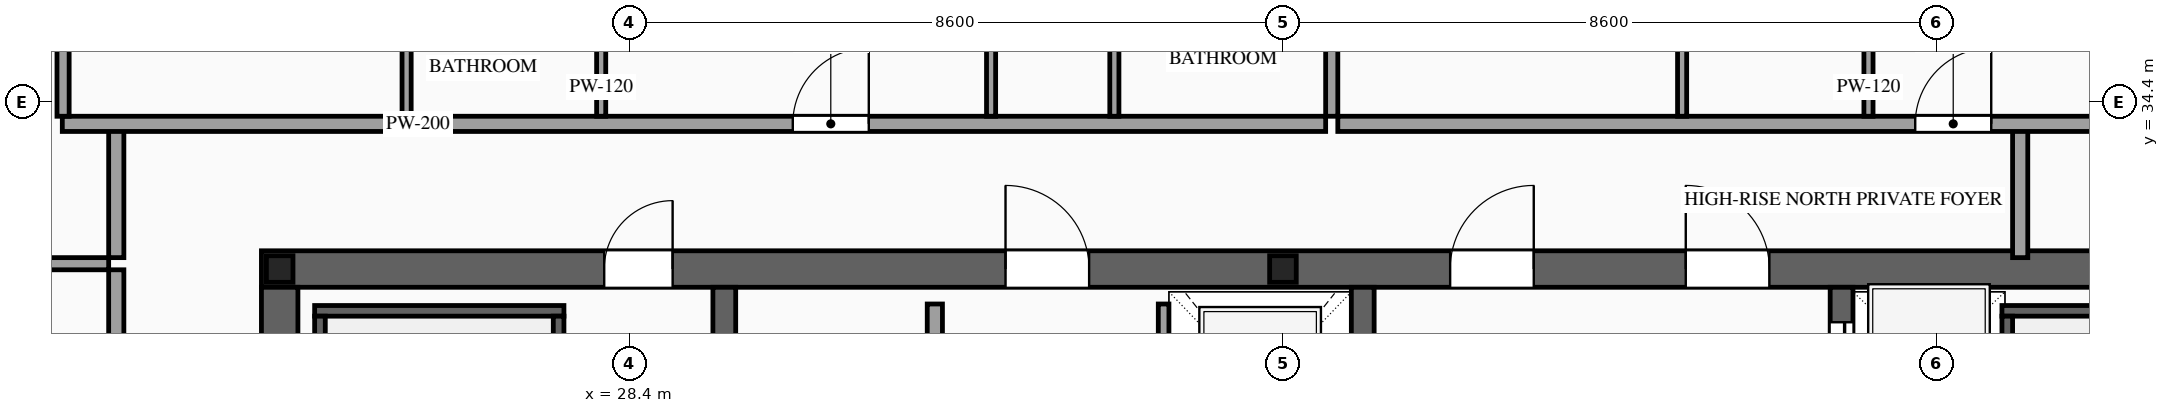
"""IFC4 building model, lengths in metres.
Left out: names, types, materials, properties, quantities, classifications, styles, units other than length and angle.
Written with IfcOpenShell. Run it as: python <this file> out.ifc"""

import sys

from ifc_helpers import new_model, si_unit, direction, frame, frame_2d, origin, origin_2d, place, context, subcontext, project, spatial, rectangle, i_section, extrude, source, transform, mapped, element, fill, save


model = new_model("IFC4")
c1 = context("Model", 3, precision=1e-05, world=origin(), true_north=direction((0.0, 1.0)))
c2 = subcontext(c1, "Body", "Model", "MODEL_VIEW")
j1 = project(units=[si_unit("LENGTHUNIT", "METRE"), si_unit("PLANEANGLEUNIT", "RADIAN")], contexts=[c1])
p1 = place(None, origin())
s1 = spatial("IfcSite", under=j1, at=p1, CompositionType="ELEMENT")
p2 = place(p1, origin())
s2 = spatial("IfcBuilding", under=s1, at=p2, CompositionType="ELEMENT")
p3 = place(p2, frame((0.0, 0.0, 289.1)))
s3 = spatial("IfcBuildingStorey", under=s2, at=p3, CompositionType="ELEMENT", Elevation=289.1)
p4 = place(p3, frame((23.56, 32.2, 0.0), z_axis=(0.0, 0.0, 1.0), x_axis=(1.0, 0.0, 0.0)))
e1 = element("IfcWall", 1, at=p4, inside=s3, PredefinedType="SHEAR", context=c2, shape_type="SweptSolid", body=[
    extrude(rectangle(XDim=26.88, YDim=0.48, at=frame_2d((13.44, 0.0))), origin(), (0.0, 0.0, 1.0), 3.5),
])
p5 = place(p4, frame((4.51, 0.0, 0.0)))
e2 = element("IfcOpeningElement", 2, at=p5, cuts=e1, PredefinedType="OPENING", context=c2, shape_type="SweptSolid", body=[
    extrude(rectangle(XDim=0.9, YDim=2.15, at=frame_2d((0.45, 1.075))), frame((0.0, 0.255, 0.0), z_axis=(0.0, -1.0, 0.0), x_axis=(1.0, 0.0, 0.0)), (0.0, 0.0, 1.0), 0.51),
])
p6 = place(p4, frame((9.79, 0.0, 0.0)))
e3 = element("IfcOpeningElement", 3, at=p6, cuts=e1, PredefinedType="OPENING", context=c2, shape_type="SweptSolid", body=[
    extrude(rectangle(XDim=1.1, YDim=2.2, at=frame_2d((0.55, 1.1))), frame((0.0, 0.255, 0.0), z_axis=(0.0, -1.0, 0.0), x_axis=(1.0, 0.0, 0.0)), (0.0, 0.0, 1.0), 0.51),
])
p7 = place(p4, frame((15.64, 0.0, 0.0)))
e4 = element("IfcOpeningElement", 4, at=p7, cuts=e1, PredefinedType="OPENING", context=c2, shape_type="SweptSolid", body=[
    extrude(rectangle(XDim=1.1, YDim=2.2, at=frame_2d((0.55, 1.1))), frame((0.0, 0.255, 0.0), z_axis=(0.0, -1.0, 0.0), x_axis=(1.0, 0.0, 0.0)), (0.0, 0.0, 1.0), 0.51),
])
p8 = place(p4, frame((18.74, 0.0, 0.0)))
e5 = element("IfcOpeningElement", 5, at=p8, cuts=e1, PredefinedType="OPENING", context=c2, shape_type="SweptSolid", body=[
    extrude(rectangle(XDim=1.1, YDim=2.2, at=frame_2d((0.55, 1.1))), frame((0.0, 0.255, 0.0), z_axis=(0.0, -1.0, 0.0), x_axis=(1.0, 0.0, 0.0)), (0.0, 0.0, 1.0), 0.51),
])
m1 = source(origin(), c2, "Body", "SweptSolid", [
    extrude(rectangle(XDim=12.32, YDim=0.48, at=frame_2d((6.16, 0.0))), origin(), (0.0, 0.0, 1.0), 3.5),
])
p9 = place(p3, frame((23.8, 19.64, 0.0), z_axis=(0.0, 0.0, 1.0), x_axis=(0.0, 1.0, 0.0)))
e6 = element("IfcWall", 6, at=p9, inside=s3, PredefinedType="SHEAR", context=c2, shape_type="MappedRepresentation", body=[
    mapped(m1, transform((0.0, 0.0, 0.0), scale=1.0)),
])
m2 = source(origin(), c2, "Body", "SweptSolid", [
    extrude(rectangle(XDim=12.32, YDim=0.3, at=frame_2d((6.16, 0.0))), origin(), (0.0, 0.0, 1.0), 3.5),
])
for number, where, z_axis, x_axis in (
    (7, (29.65, 19.64, 0.0), (0.0, 0.0, 1.0), (0.0, 1.0, 0.0)),
    (8, (38.05, 19.64, 0.0), (0.0, 0.0, 1.0), (0.0, 1.0, 0.0)),
):
    element("IfcWall", number, at=place(p3, frame(where, z_axis=z_axis, x_axis=x_axis)), inside=s3, PredefinedType="SOLIDWALL", context=c2, shape_type="MappedRepresentation", body=[
        mapped(m2, transform((0.0, 0.0, 0.0), scale=1.0)),
    ])
p10 = place(p3, frame((44.35, 19.64, 0.0), z_axis=(0.0, 0.0, 1.0), x_axis=(0.0, 1.0, 0.0)))
e9 = element("IfcWall", 9, at=p10, inside=s3, PredefinedType="SOLIDWALL", context=c2, shape_type="SweptSolid", body=[
    extrude(rectangle(XDim=12.32, YDim=0.3, at=frame_2d((6.16, 0.0))), origin(), (0.0, 0.0, 1.0), 3.5),
])
p11 = place(p10, frame((6.56, 0.0, 0.0)))
e10 = element("IfcOpeningElement", 10, at=p11, cuts=e9, PredefinedType="OPENING", context=c2, shape_type="SweptSolid", body=[
    extrude(rectangle(XDim=1.1, YDim=2.2, at=frame_2d((0.55, 1.1))), frame((0.0, 0.165, 0.0), z_axis=(0.0, -1.0, 0.0), x_axis=(1.0, 0.0, 0.0)), (0.0, 0.0, 1.0), 0.33),
])
p12 = place(p10, frame((8.66, 0.0, 0.0)))
e11 = element("IfcOpeningElement", 11, at=p12, cuts=e9, PredefinedType="OPENING", context=c2, shape_type="SweptSolid", body=[
    extrude(rectangle(XDim=1.1, YDim=2.2, at=frame_2d((0.55, 1.1))), frame((0.0, 0.165, 0.0), z_axis=(0.0, -1.0, 0.0), x_axis=(1.0, 0.0, 0.0)), (0.0, 0.0, 1.0), 0.33),
])
p13 = place(p10, frame((10.76, 0.0, 0.0)))
e12 = element("IfcOpeningElement", 12, at=p13, cuts=e9, PredefinedType="OPENING", context=c2, shape_type="SweptSolid", body=[
    extrude(rectangle(XDim=1.1, YDim=2.2, at=frame_2d((0.55, 1.1))), frame((0.0, 0.165, 0.0), z_axis=(0.0, -1.0, 0.0), x_axis=(1.0, 0.0, 0.0)), (0.0, 0.0, 1.0), 0.33),
])
m3 = source(origin(), c2, "Body", "SweptSolid", [
    extrude(i_section(OverallWidth=0.35, OverallDepth=0.35, WebThickness=0.012, FlangeThickness=0.019, at=origin_2d()), origin(), (0.0, 0.0, 1.0), 3.5),
])
for number, where, z_axis, x_axis in (
    (13, (23.8, 32.2, 0.0), (0.0, 0.0, 1.0), (1.0, 0.0, 0.0)),
    (14, (37.0, 32.2, 0.0), (0.0, 0.0, 1.0), (1.0, 0.0, 0.0)),
):
    element("IfcColumn", number, at=place(p3, frame(where, z_axis=z_axis, x_axis=x_axis)), inside=s3, PredefinedType="COLUMN", context=c2, shape_type="MappedRepresentation", body=[
        mapped(m3, transform((0.0, 0.0, 0.0), scale=1.0)),
    ])
p14 = place(p3, frame((35.43, 29.4, 0.0), z_axis=(0.0, 0.0, 1.0), x_axis=(0.0, 1.0, 0.0)))
e15 = element("IfcWall", 15, at=p14, inside=s3, PredefinedType="SOLIDWALL", context=c2, shape_type="SweptSolid", body=[
    extrude(rectangle(XDim=2.34, YDim=0.14, at=frame_2d((1.17, 0.0))), origin(), (0.0, 0.0, 1.0), 3.28),
])
p15 = place(p14, frame((0.62, 0.0, 0.0)))
e16 = element("IfcOpeningElement", 16, at=p15, cuts=e15, PredefinedType="OPENING", context=c2, shape_type="SweptSolid", body=[
    extrude(rectangle(XDim=1.1, YDim=2.2, at=frame_2d((0.55, 1.1))), frame((0.0, 0.085, 0.0), z_axis=(0.0, -1.0, 0.0), x_axis=(1.0, 0.0, 0.0)), (0.0, 0.0, 1.0), 0.17),
])
m4 = source(origin(), c2, "Body", "SweptSolid", [
    extrude(rectangle(XDim=3.28, YDim=0.14, at=frame_2d((1.64, 0.0))), origin(), (0.0, 0.0, 1.0), 3.28),
])
p16 = place(p3, frame((24.26, 31.65, 0.0), z_axis=(0.0, 0.0, 1.0), x_axis=(1.0, 0.0, 0.0)))
e17 = element("IfcWall", 17, at=p16, inside=s3, PredefinedType="SOLIDWALL", context=c2, shape_type="MappedRepresentation", body=[
    mapped(m4, transform((0.0, 0.0, 0.0), scale=1.0)),
])
m5 = source(origin(), c2, "Body", "SweptSolid", [
    extrude(rectangle(XDim=8.94, YDim=0.14, at=frame_2d((4.47, 0.0))), origin(), (0.0, 0.0, 1.0), 3.28),
])
for number, where, z_axis, x_axis in (
    (18, (24.33, 22.64, 0.0), (0.0, 0.0, 1.0), (0.0, 1.0, 0.0)),
    (19, (27.47, 22.64, 0.0), (0.0, 0.0, 1.0), (0.0, 1.0, 0.0)),
):
    element("IfcWall", number, at=place(p3, frame(where, z_axis=z_axis, x_axis=x_axis)), inside=s3, PredefinedType="SOLIDWALL", context=c2, shape_type="MappedRepresentation", body=[
        mapped(m5, transform((0.0, 0.0, 0.0), scale=1.0)),
    ])
p17 = place(p3, frame((46.46, 31.65, 0.0), z_axis=(0.0, 0.0, 1.0), x_axis=(1.0, 0.0, 0.0)))
e20 = element("IfcWall", 20, at=p17, inside=s3, PredefinedType="SOLIDWALL", context=c2, shape_type="MappedRepresentation", body=[
    mapped(m4, transform((0.0, 0.0, 0.0), scale=1.0)),
])
p18 = place(p3, frame((46.53, 22.64, 0.0), z_axis=(0.0, 0.0, 1.0), x_axis=(0.0, 1.0, 0.0)))
e21 = element("IfcWall", 21, at=p18, inside=s3, PredefinedType="SOLIDWALL", context=c2, shape_type="MappedRepresentation", body=[
    mapped(m5, transform((0.0, 0.0, 0.0), scale=1.0)),
])
p19 = place(p3, frame((32.42, 24.05, 0.0), z_axis=(0.0, 0.0, 1.0), x_axis=(0.0, 1.0, 0.0)))
e22 = element("IfcWall", 22, at=p19, inside=s3, PredefinedType="PARTITIONING", context=c2, shape_type="SweptSolid", body=[
    extrude(rectangle(XDim=7.69, YDim=0.2, at=frame_2d((3.845, 0.0))), origin(), (0.0, 0.0, 1.0), 3.28),
])
p20 = place(p19, frame((3.395, 0.0, 0.0)))
e23 = element("IfcOpeningElement", 23, at=p20, cuts=e22, PredefinedType="OPENING", context=c2, shape_type="SweptSolid", body=[
    extrude(rectangle(XDim=0.9, YDim=2.15, at=frame_2d((0.45, 1.075))), frame((0.0, 0.115, 0.0), z_axis=(0.0, -1.0, 0.0), x_axis=(1.0, 0.0, 0.0)), (0.0, 0.0, 1.0), 0.23),
])
m6 = source(origin(), c2, "Body", "SweptSolid", [
    extrude(rectangle(XDim=1.7, YDim=0.2, at=frame_2d((0.85, 0.0))), origin(), (0.0, 0.0, 1.0), 3.28),
])
for number, where, z_axis, x_axis in (
    (24, (21.65, 32.35, 0.0), (0.0, 0.0, 1.0), (0.0, 1.0, 0.0)),
    (25, (46.7, 32.35, 0.0), (0.0, 0.0, 1.0), (0.0, 1.0, 0.0)),
):
    element("IfcWall", number, at=place(p3, frame(where, z_axis=z_axis, x_axis=x_axis)), inside=s3, PredefinedType="PARTITIONING", context=c2, shape_type="MappedRepresentation", body=[
        mapped(m6, transform((0.0, 0.0, 0.0), scale=1.0)),
    ])
p21 = place(p3, frame((20.94, 34.11, 0.0), z_axis=(0.0, 0.0, 1.0), x_axis=(1.0, 0.0, 0.0)))
e26 = element("IfcWall", 26, at=p21, inside=s3, PredefinedType="PARTITIONING", context=c2, shape_type="SweptSolid", body=[
    extrude(rectangle(XDim=16.622, YDim=0.2, at=frame_2d((8.311, 0.0))), origin(), (0.0, 0.0, 1.0), 3.28),
])
p22 = place(p21, frame((9.611, 0.0, 0.0)))
e27 = element("IfcOpeningElement", 27, at=p22, cuts=e26, PredefinedType="OPENING", context=c2, shape_type="SweptSolid", body=[
    extrude(rectangle(XDim=1.0, YDim=2.2, at=frame_2d((0.5, 1.1))), frame((0.0, 0.115, 0.0), z_axis=(0.0, -1.0, 0.0), x_axis=(1.0, 0.0, 0.0)), (0.0, 0.0, 1.0), 0.23),
])
m7 = source(origin(), c2, "Body", "SweptSolid", [
    extrude(rectangle(XDim=10.54, YDim=0.16, at=frame_2d((5.27, 0.0))), origin(), (0.0, 0.0, 1.0), 3.28),
])
p23 = place(p3, frame((37.642, 34.21, 0.0), z_axis=(0.0, 0.0, 1.0), x_axis=(0.0, 1.0, 0.0)))
e28 = element("IfcWall", 28, at=p23, inside=s3, PredefinedType="PARTITIONING", context=c2, shape_type="MappedRepresentation", body=[
    mapped(m7, transform((0.0, 0.0, 0.0), scale=1.0)),
])
m8 = source(origin(), c2, "Body", "SweptSolid", [
    extrude(rectangle(XDim=2.9, YDim=0.12, at=frame_2d((1.45, 0.0))), origin(), (0.0, 0.0, 1.0), 3.28),
])
p24 = place(p3, frame((25.47, 34.21, 0.0), z_axis=(0.0, 0.0, 1.0), x_axis=(0.0, 1.0, 0.0)))
e29 = element("IfcWall", 29, at=p24, inside=s3, PredefinedType="PARTITIONING", context=c2, shape_type="MappedRepresentation", body=[
    mapped(m8, transform((0.0, 0.0, 0.0), scale=1.0)),
])
p25 = place(p3, frame((28.03, 34.21, 0.0), z_axis=(0.0, 0.0, 1.0), x_axis=(0.0, 1.0, 0.0)))
e30 = element("IfcWall", 30, at=p25, inside=s3, PredefinedType="PARTITIONING", context=c2, shape_type="SweptSolid", body=[
    extrude(rectangle(XDim=2.9, YDim=0.12, at=frame_2d((1.45, 0.0))), origin(), (0.0, 0.0, 1.0), 3.28),
])
p26 = place(p25, frame((1.025, 0.0, 0.0)))
e31 = element("IfcOpeningElement", 31, at=p26, cuts=e30, PredefinedType="OPENING", context=c2, shape_type="SweptSolid", body=[
    extrude(rectangle(XDim=0.85, YDim=2.1, at=frame_2d((0.425, 1.05))), frame((0.0, 0.075, 0.0), z_axis=(0.0, -1.0, 0.0), x_axis=(1.0, 0.0, 0.0)), (0.0, 0.0, 1.0), 0.15),
])
for number, where, z_axis, x_axis in (
    (32, (34.782, 34.21, 0.0), (0.0, 0.0, 1.0), (0.0, 1.0, 0.0)),
    (33, (33.16, 34.21, 0.0), (0.0, 0.0, 1.0), (0.0, 1.0, 0.0)),
):
    element("IfcWall", number, at=place(p3, frame(where, z_axis=z_axis, x_axis=x_axis)), inside=s3, PredefinedType="PARTITIONING", context=c2, shape_type="MappedRepresentation", body=[
        mapped(m8, transform((0.0, 0.0, 0.0), scale=1.0)),
    ])
p27 = place(p3, frame((37.722, 34.11, 0.0), z_axis=(0.0, 0.0, 1.0), x_axis=(1.0, 0.0, 0.0)))
e34 = element("IfcWall", 34, at=p27, inside=s3, PredefinedType="PARTITIONING", context=c2, shape_type="SweptSolid", body=[
    extrude(rectangle(XDim=15.338, YDim=0.2, at=frame_2d((7.669, 0.0))), origin(), (0.0, 0.0, 1.0), 3.28),
])
p28 = place(p27, frame((7.597, 0.0, 0.0)))
e35 = element("IfcOpeningElement", 35, at=p28, cuts=e34, PredefinedType="OPENING", context=c2, shape_type="SweptSolid", body=[
    extrude(rectangle(XDim=1.0, YDim=2.2, at=frame_2d((0.5, 1.1))), frame((0.0, 0.115, 0.0), z_axis=(0.0, -1.0, 0.0), x_axis=(1.0, 0.0, 0.0)), (0.0, 0.0, 1.0), 0.23),
])
m9 = source(origin(), c2, "Body", "SweptSolid", [
    extrude(rectangle(XDim=10.39, YDim=0.16, at=frame_2d((5.195, 0.0))), origin(), (0.0, 0.0, 1.0), 3.28),
])
p29 = place(p3, frame((20.95, 34.21, 0.0), z_axis=(0.0, 0.0, 1.0), x_axis=(0.0, 1.0, 0.0)))
e36 = element("IfcWall", 36, at=p29, inside=s3, PredefinedType="PARTITIONING", context=c2, shape_type="MappedRepresentation", body=[
    mapped(m9, transform((0.0, 0.0, 0.0), scale=1.0)),
])
p30 = place(p3, frame((42.252, 34.21, 0.0), z_axis=(0.0, 0.0, 1.0), x_axis=(0.0, 1.0, 0.0)))
e37 = element("IfcWall", 37, at=p30, inside=s3, PredefinedType="PARTITIONING", context=c2, shape_type="MappedRepresentation", body=[
    mapped(m8, transform((0.0, 0.0, 0.0), scale=1.0)),
])
p31 = place(p3, frame((44.704, 34.21, 0.0), z_axis=(0.0, 0.0, 1.0), x_axis=(0.0, 1.0, 0.0)))
e38 = element("IfcWall", 38, at=p31, inside=s3, PredefinedType="PARTITIONING", context=c2, shape_type="SweptSolid", body=[
    extrude(rectangle(XDim=2.9, YDim=0.12, at=frame_2d((1.45, 0.0))), origin(), (0.0, 0.0, 1.0), 3.28),
])
p32 = place(p31, frame((1.025, 0.0, 0.0)))
e39 = element("IfcOpeningElement", 39, at=p32, cuts=e38, PredefinedType="OPENING", context=c2, shape_type="SweptSolid", body=[
    extrude(rectangle(XDim=0.85, YDim=2.1, at=frame_2d((0.425, 1.05))), frame((0.0, 0.075, 0.0), z_axis=(0.0, -1.0, 0.0), x_axis=(1.0, 0.0, 0.0)), (0.0, 0.0, 1.0), 0.15),
])
p33 = place(p3, frame((21.65, 19.41, 0.0), z_axis=(0.0, 0.0, 1.0), x_axis=(0.0, 1.0, 0.0)))
e40 = element("IfcWall", 40, at=p33, inside=s3, PredefinedType="PARTITIONING", context=c2, shape_type="SweptSolid", body=[
    extrude(rectangle(XDim=12.78, YDim=0.2, at=frame_2d((6.39, 0.0))), origin(), (0.0, 0.0, 1.0), 3.28),
])
p34 = place(p33, frame((5.89, 0.0, 0.0)))
e41 = element("IfcOpeningElement", 41, at=p34, cuts=e40, PredefinedType="OPENING", context=c2, shape_type="SweptSolid", body=[
    extrude(rectangle(XDim=1.0, YDim=2.2, at=frame_2d((0.5, 1.1))), frame((0.0, 0.115, 0.0), z_axis=(0.0, -1.0, 0.0), x_axis=(1.0, 0.0, 0.0)), (0.0, 0.0, 1.0), 0.23),
])
m10 = source(origin(), c2, "Body", "SweptSolid", [
    extrude(rectangle(XDim=3.5, YDim=0.16, at=frame_2d((1.75, 0.0))), origin(), (0.0, 0.0, 1.0), 2.825),
])
p35 = place(p3, frame((18.05, 32.27, 0.0), z_axis=(0.0, 0.0, 1.0), x_axis=(1.0, 0.0, 0.0)))
e42 = element("IfcWall", 42, at=p35, inside=s3, PredefinedType="PARTITIONING", context=c2, shape_type="MappedRepresentation", body=[
    mapped(m10, transform((0.0, 0.0, 0.0), scale=1.0)),
])
m11 = source(origin(), c2, "Body", "SweptSolid", [
    extrude(rectangle(XDim=1.1, YDim=2.2, at=frame_2d((0.55, 1.1))), frame((0.0, 0.025, 0.0), z_axis=(0.0, -1.0, 0.0), x_axis=(1.0, 0.0, 0.0)), (0.0, 0.0, 1.0), 0.05),
])
p36 = place(p13, origin())
e43 = element("IfcDoor", 43, at=p36, inside=s3, OperationType="SLIDING_TO_LEFT", PredefinedType="DOOR", context=c2, shape_type="MappedRepresentation", body=[
    mapped(m11, transform((0.0, 0.0, 0.0), scale=1.0)),
])
fill(e12, e43)
m12 = source(origin(), c2, "Body", "SweptSolid", [
    extrude(rectangle(XDim=0.9, YDim=2.15, at=frame_2d((0.45, 1.075))), frame((0.0, 0.025, 0.0), z_axis=(0.0, -1.0, 0.0), x_axis=(1.0, 0.0, 0.0)), (0.0, 0.0, 1.0), 0.05),
])
p37 = place(p5, origin())
e44 = element("IfcDoor", 44, at=p37, inside=s3, OperationType="SINGLE_SWING_RIGHT", PredefinedType="DOOR", context=c2, shape_type="MappedRepresentation", body=[
    mapped(m12, transform((0.0, 0.0, 0.0), scale=1.0)),
])
fill(e2, e44)
m13 = source(origin(), c2, "Body", "SweptSolid", [
    extrude(rectangle(XDim=1.1, YDim=2.2, at=frame_2d((0.55, 1.1))), frame((0.0, 0.025, 0.0), z_axis=(0.0, -1.0, 0.0), x_axis=(1.0, 0.0, 0.0)), (0.0, 0.0, 1.0), 0.05),
])
p38 = place(p6, origin())
e45 = element("IfcDoor", 45, at=p38, inside=s3, OperationType="SINGLE_SWING_LEFT", PredefinedType="DOOR", context=c2, shape_type="MappedRepresentation", body=[
    mapped(m13, transform((0.0, 0.0, 0.0), scale=1.0)),
])
fill(e3, e45)
p39 = place(p7, origin())
e46 = element("IfcDoor", 46, at=p39, inside=s3, OperationType="SINGLE_SWING_RIGHT", PredefinedType="DOOR", context=c2, shape_type="MappedRepresentation", body=[
    mapped(m13, transform((0.0, 0.0, 0.0), scale=1.0)),
])
fill(e4, e46)
p40 = place(p8, origin())
e47 = element("IfcDoor", 47, at=p40, inside=s3, OperationType="SINGLE_SWING_LEFT", PredefinedType="DOOR", context=c2, shape_type="MappedRepresentation", body=[
    mapped(m13, transform((0.0, 0.0, 0.0), scale=1.0)),
])
fill(e5, e47)
m14 = source(origin(), c2, "Body", "SweptSolid", [
    extrude(rectangle(XDim=1.0, YDim=2.2, at=frame_2d((0.5, 1.1))), frame((0.0, 0.025, 0.0), z_axis=(0.0, -1.0, 0.0), x_axis=(1.0, 0.0, 0.0)), (0.0, 0.0, 1.0), 0.05),
])
p41 = place(p22, origin())
e48 = element("IfcDoor", 48, at=p41, inside=s3, OperationType="SINGLE_SWING_RIGHT", PredefinedType="DOOR", context=c2, shape_type="MappedRepresentation", body=[
    mapped(m14, transform((0.0, 0.0, 0.0), scale=1.0)),
])
fill(e27, e48)
p42 = place(p28, origin())
e49 = element("IfcDoor", 49, at=p42, inside=s3, OperationType="SINGLE_SWING_RIGHT", PredefinedType="DOOR", context=c2, shape_type="MappedRepresentation", body=[
    mapped(m14, transform((0.0, 0.0, 0.0), scale=1.0)),
])
fill(e35, e49)
save(model, sys.argv[1])
